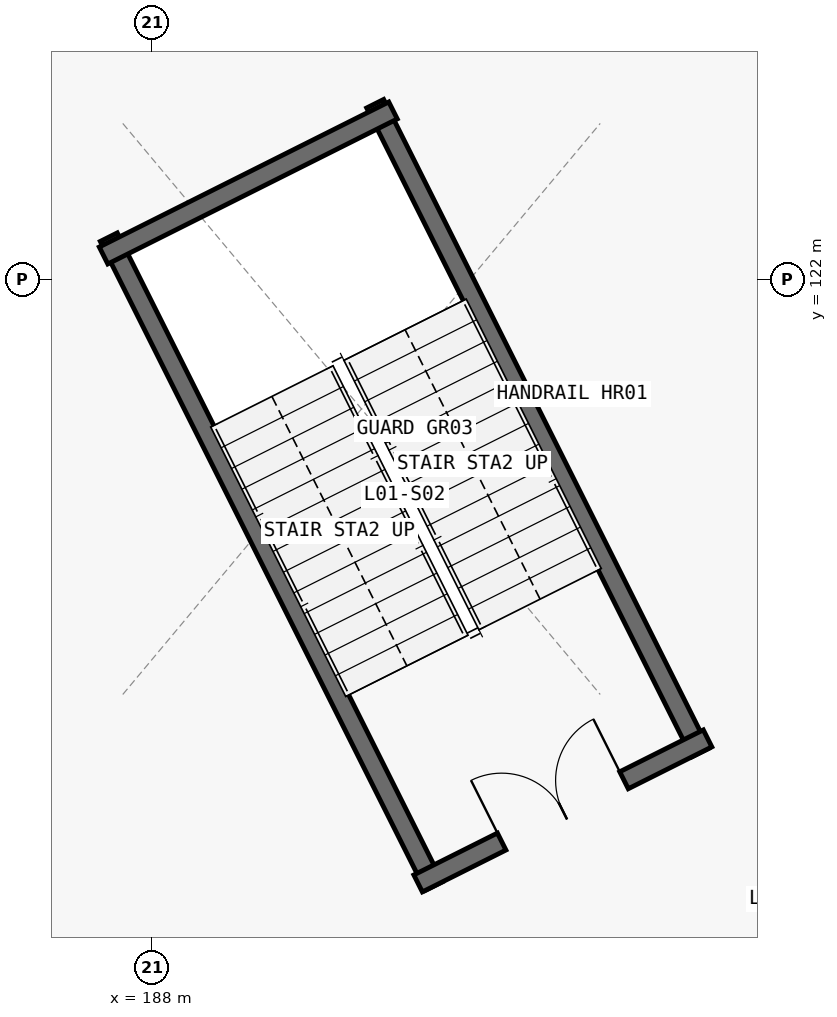
"""IFC4 building model, lengths in metres.
Left out: names, types, materials, properties, quantities, classifications, styles, units other than length and angle.
Written with IfcOpenShell. Run it as: python <this file> out.ifc"""

import sys

from ifc_helpers import new_model, si_unit, direction, frame, frame_2d, origin, place, context, subcontext, project, spatial, rectangle, extrude, element, fill, save


model = new_model("IFC4")
c1 = context("Model", 3, precision=1e-05, world=origin(), true_north=direction((0.0, 1.0)))
c2 = subcontext(c1, "Body", "Model", "MODEL_VIEW")
j1 = project(units=[si_unit("LENGTHUNIT", "METRE"), si_unit("PLANEANGLEUNIT", "RADIAN")], contexts=[c1])
p1 = place(None, origin())
s1 = spatial("IfcSite", under=j1, at=p1, CompositionType="ELEMENT")
p2 = place(p1, origin())
s2 = spatial("IfcBuilding", under=s1, at=p2, CompositionType="ELEMENT")
p3 = place(p2, frame((0.0, 0.0, 5.4)))
s3 = spatial("IfcBuildingStorey", under=s2, at=p3, CompositionType="ELEMENT", Elevation=5.4)
for number, where, z_axis, x_axis in (
    (1, (195.215, 115.774, 0.0), (0.0, 0.0, 1.0), (-0.448, 0.894, 0.0)),
    (2, (187.432, 122.557, 0.0), (0.0, 0.0, 1.0), (0.448, -0.894, 0.0)),
):
    element("IfcWall", number, at=place(p3, frame(where, z_axis=z_axis, x_axis=x_axis)), inside=s3, PredefinedType="SHEAR", context=c2, shape_type="SweptSolid", body=[
        extrude(rectangle(XDim=9.55, YDim=0.25, at=frame_2d((4.775, 0.0))), origin(), (0.0, 0.0, 1.0), 4.52),
    ])
p4 = place(p3, frame((191.502, 114.054, 0.0), z_axis=(0.0, 0.0, 1.0), x_axis=(0.89409454548, 0.447878268888, 0.0)))
e3 = element("IfcWall", 3, at=p4, inside=s3, PredefinedType="SHEAR", context=c2, shape_type="SweptSolid", body=[
    extrude(rectangle(XDim=4.26, YDim=0.25, at=frame_2d((2.13, 0.0))), origin(), (0.0, 0.0, 1.0), 4.52),
])
p5 = place(p4, frame((1.23, 0.0, 0.0)))
e4 = element("IfcOpeningElement", 4, at=p5, cuts=e3, PredefinedType="OPENING", context=c2, shape_type="SweptSolid", body=[
    extrude(rectangle(XDim=1.8, YDim=2.25, at=frame_2d((0.9, 1.125))), frame((0.0, 0.135, 0.0), z_axis=(0.0, -1.0, 0.0), x_axis=(1.0, 0.0, 0.0)), (0.0, 0.0, 1.0), 0.27),
])
p6 = place(p3, frame((191.172, 124.223, 0.0), z_axis=(0.0, 0.0, 1.0), x_axis=(-0.89409454548, -0.447878268888, 0.0)))
e5 = element("IfcWall", 5, at=p6, inside=s3, PredefinedType="SHEAR", context=c2, shape_type="SweptSolid", body=[
    extrude(rectangle(XDim=4.26, YDim=0.25, at=frame_2d((2.13, 0.0))), origin(), (0.0, 0.0, 1.0), 4.52),
])
p7 = place(p5, origin())
e6 = element("IfcDoor", 6, at=p7, inside=s3, OperationType="DOUBLE_DOOR_SINGLE_SWING", PredefinedType="DOOR", context=c2, shape_type="SweptSolid", body=[
    extrude(rectangle(XDim=1.8, YDim=2.25, at=frame_2d((0.9, 1.125))), frame((0.0, 0.025, 0.0), z_axis=(0.0, -1.0, 0.0), x_axis=(1.0, 0.0, 0.0)), (0.0, 0.0, 1.0), 0.05),
])
fill(e4, e6)
save(model, sys.argv[1])
